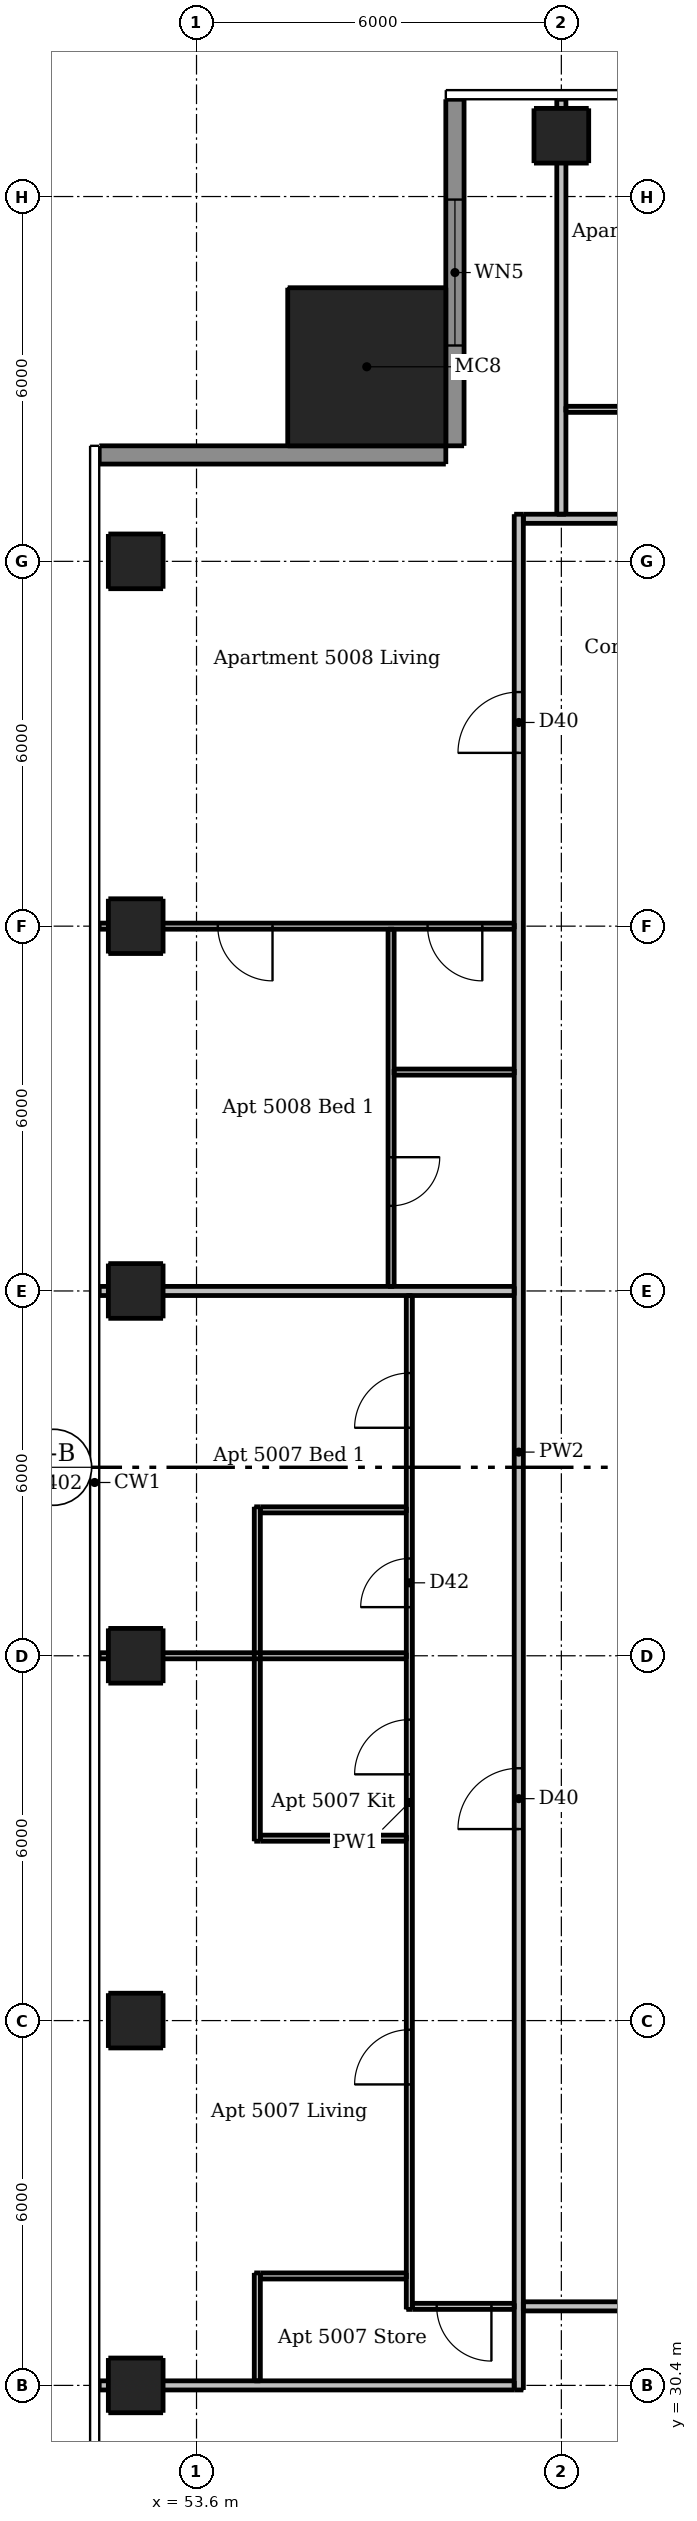
"""IFC4 building model, lengths in metres.
Left out: names, types, materials, properties, quantities, classifications, styles, units other than length and angle.
Written with IfcOpenShell. Run it as: python <this file> out.ifc"""

import sys

from ifc_helpers import new_model, si_unit, direction, frame, frame_2d, origin, origin_2d, place, context, subcontext, project, spatial, rectangle, extrude, element, fill, save


model = new_model("IFC4")
c1 = context("Model", 3, precision=1e-05, world=origin(), true_north=direction((0.0, 1.0)))
c2 = subcontext(c1, "Body", "Model", "MODEL_VIEW")
j1 = project(units=[si_unit("LENGTHUNIT", "METRE"), si_unit("PLANEANGLEUNIT", "RADIAN")], contexts=[c1])
p1 = place(None, origin())
s1 = spatial("IfcSite", under=j1, at=p1, CompositionType="ELEMENT")
p2 = place(p1, origin())
s2 = spatial("IfcBuilding", under=s1, at=p2, CompositionType="ELEMENT")
p3 = place(p2, frame((0.0, 0.0, 190.3)))
s3 = spatial("IfcBuildingStorey", under=s2, at=p3, CompositionType="ELEMENT", Elevation=190.3)
for number, where, z_axis, x_axis in (
    (1, (59.6, 67.4, 0.0), (0.0, 0.0, 1.0), (1.0, 0.0, 0.0)),
    (2, (52.6, 30.4, 0.0), (0.0, 0.0, 1.0), (1.0, 0.0, 0.0)),
    (3, (52.6, 36.4, 0.0), (0.0, 0.0, 1.0), (1.0, 0.0, 0.0)),
    (4, (52.6, 42.4, 0.0), (0.0, 0.0, 1.0), (1.0, 0.0, 0.0)),
    (5, (52.6, 48.4, 0.0), (0.0, 0.0, 1.0), (1.0, 0.0, 0.0)),
    (6, (52.6, 54.4, 0.0), (0.0, 0.0, 1.0), (1.0, 0.0, 0.0)),
    (7, (52.6, 60.4, 0.0), (0.0, 0.0, 1.0), (1.0, 0.0, 0.0)),
):
    element("IfcColumn", number, at=place(p3, frame(where, z_axis=z_axis, x_axis=x_axis)), inside=s3, PredefinedType="COLUMN", context=c2, shape_type="SweptSolid", body=[
        extrude(rectangle(XDim=0.9, YDim=0.9, at=origin_2d()), origin(), (0.0, 0.0, 1.0), 3.05),
    ])
p4 = place(p3, frame((56.4, 63.6, 0.0), z_axis=(0.0, 0.0, 1.0), x_axis=(1.0, 0.0, 0.0)))
e8 = element("IfcColumn", 8, at=p4, inside=s3, PredefinedType="COLUMN", context=c2, shape_type="SweptSolid", body=[
    extrude(rectangle(XDim=2.6, YDim=2.6, at=origin_2d()), origin(), (0.0, 0.0, 1.0), 3.3),
])
p5 = place(p3, frame((57.85, 68.0, 0.0), z_axis=(0.0, 0.0, 1.0), x_axis=(0.0, -1.0, 0.0)))
e9 = element("IfcWall", 9, at=p5, inside=s3, PredefinedType="SOLIDWALL", context=c2, shape_type="SweptSolid", body=[
    extrude(rectangle(XDim=5.7, YDim=0.3, at=frame_2d((2.85, 0.0))), origin(), (0.0, 0.0, 1.0), 3.05),
])
p6 = place(p5, frame((1.65, 0.0, 0.15)))
e10 = element("IfcOpeningElement", 10, at=p6, cuts=e9, PredefinedType="OPENING", context=c2, shape_type="SweptSolid", body=[
    extrude(rectangle(XDim=2.4, YDim=2.1, at=frame_2d((1.2, 1.05))), frame((0.0, 0.16, 0.0), z_axis=(0.0, -1.0, 0.0), x_axis=(1.0, 0.0, 0.0)), (0.0, 0.0, 1.0), 0.32),
])
p7 = place(p3, frame((57.7, 62.15, 0.0), z_axis=(0.0, 0.0, 1.0), x_axis=(-1.0, 0.0, 0.0)))
e11 = element("IfcWall", 11, at=p7, inside=s3, PredefinedType="SOLIDWALL", context=c2, shape_type="SweptSolid", body=[
    extrude(rectangle(XDim=5.7, YDim=0.3, at=frame_2d((2.85, 0.0))), origin(), (0.0, 0.0, 1.0), 3.05),
])
p8 = place(p3, frame((54.6, 30.475, 0.0), z_axis=(0.0, 0.0, 1.0), x_axis=(0.0, 1.0, 0.0)))
e12 = element("IfcWall", 12, at=p8, inside=s3, PredefinedType="PARTITIONING", context=c2, shape_type="SweptSolid", body=[
    extrude(rectangle(XDim=1.775, YDim=0.1, at=frame_2d((0.887, 0.0))), origin(), (0.0, 0.0, 1.0), 3.05),
])
p9 = place(p3, frame((54.6, 39.35, 0.0), z_axis=(0.0, 0.0, 1.0), x_axis=(0.0, 1.0, 0.0)))
e13 = element("IfcWall", 13, at=p9, inside=s3, PredefinedType="PARTITIONING", context=c2, shape_type="SweptSolid", body=[
    extrude(rectangle(XDim=5.5, YDim=0.1, at=frame_2d((2.75, 0.0))), origin(), (0.0, 0.0, 1.0), 3.05),
])
p10 = place(p3, frame((56.8, 54.35, 0.0), z_axis=(0.0, 0.0, 1.0), x_axis=(0.0, -1.0, 0.0)))
e14 = element("IfcWall", 14, at=p10, inside=s3, PredefinedType="PARTITIONING", context=c2, shape_type="SweptSolid", body=[
    extrude(rectangle(XDim=5.875, YDim=0.1, at=frame_2d((2.938, 0.0))), origin(), (0.0, 0.0, 1.0), 3.05),
])
p11 = place(p10, frame((3.75, 0.0, 0.0)))
e15 = element("IfcOpeningElement", 15, at=p11, cuts=e14, PredefinedType="OPENING", context=c2, shape_type="SweptSolid", body=[
    extrude(rectangle(XDim=0.8, YDim=2.1, at=frame_2d((0.4, 1.05))), frame((0.0, 0.06, 0.0), z_axis=(0.0, -1.0, 0.0), x_axis=(1.0, 0.0, 0.0)), (0.0, 0.0, 1.0), 0.12),
])
p12 = place(p3, frame((57.1, 31.65, 0.0), z_axis=(0.0, 0.0, 1.0), x_axis=(0.0, 1.0, 0.0)))
e16 = element("IfcWall", 16, at=p12, inside=s3, PredefinedType="PARTITIONING", context=c2, shape_type="SweptSolid", body=[
    extrude(rectangle(XDim=16.675, YDim=0.1, at=frame_2d((8.337, 0.0))), origin(), (0.0, 0.0, 1.0), 3.05),
])
p13 = place(p12, frame((3.7, 0.0, 0.0)))
e17 = element("IfcOpeningElement", 17, at=p13, cuts=e16, PredefinedType="OPENING", context=c2, shape_type="SweptSolid", body=[
    extrude(rectangle(XDim=0.9, YDim=2.1, at=frame_2d((0.45, 1.05))), frame((0.0, 0.06, 0.0), z_axis=(0.0, -1.0, 0.0), x_axis=(1.0, 0.0, 0.0)), (0.0, 0.0, 1.0), 0.12),
])
p14 = place(p12, frame((8.8, 0.0, 0.0)))
e18 = element("IfcOpeningElement", 18, at=p14, cuts=e16, PredefinedType="OPENING", context=c2, shape_type="SweptSolid", body=[
    extrude(rectangle(XDim=0.9, YDim=2.1, at=frame_2d((0.45, 1.05))), frame((0.0, 0.06, 0.0), z_axis=(0.0, -1.0, 0.0), x_axis=(1.0, 0.0, 0.0)), (0.0, 0.0, 1.0), 0.12),
])
p15 = place(p12, frame((14.5, 0.0, 0.0)))
e19 = element("IfcOpeningElement", 19, at=p15, cuts=e16, PredefinedType="OPENING", context=c2, shape_type="SweptSolid", body=[
    extrude(rectangle(XDim=0.9, YDim=2.1, at=frame_2d((0.45, 1.05))), frame((0.0, 0.06, 0.0), z_axis=(0.0, -1.0, 0.0), x_axis=(1.0, 0.0, 0.0)), (0.0, 0.0, 1.0), 0.12),
])
p16 = place(p12, frame((11.55, 0.0, 0.0)))
e20 = element("IfcOpeningElement", 20, at=p16, cuts=e16, PredefinedType="OPENING", context=c2, shape_type="SweptSolid", body=[
    extrude(rectangle(XDim=0.8, YDim=2.1, at=frame_2d((0.4, 1.05))), frame((0.0, 0.06, 0.0), z_axis=(0.0, -1.0, 0.0), x_axis=(1.0, 0.0, 0.0)), (0.0, 0.0, 1.0), 0.12),
])
p17 = place(p3, frame((59.675, 62.9, 0.0), z_axis=(0.0, 0.0, 1.0), x_axis=(1.0, 0.0, 0.0)))
e21 = element("IfcWall", 21, at=p17, inside=s3, PredefinedType="PARTITIONING", context=c2, shape_type="SweptSolid", body=[
    extrude(rectangle(XDim=17.85, YDim=0.1, at=frame_2d((8.925, 0.0))), origin(), (0.0, 0.0, 1.0), 3.05),
])
p18 = place(p17, frame((10.875, 0.0, 0.0)))
e22 = element("IfcOpeningElement", 22, at=p18, cuts=e21, PredefinedType="OPENING", context=c2, shape_type="SweptSolid", body=[
    extrude(rectangle(XDim=0.9, YDim=2.1, at=frame_2d((0.45, 1.05))), frame((0.0, 0.06, 0.0), z_axis=(0.0, -1.0, 0.0), x_axis=(1.0, 0.0, 0.0)), (0.0, 0.0, 1.0), 0.12),
])
p19 = place(p17, frame((15.975, 0.0, 0.0)))
e23 = element("IfcOpeningElement", 23, at=p19, cuts=e21, PredefinedType="OPENING", context=c2, shape_type="SweptSolid", body=[
    extrude(rectangle(XDim=0.9, YDim=2.1, at=frame_2d((0.45, 1.05))), frame((0.0, 0.06, 0.0), z_axis=(0.0, -1.0, 0.0), x_axis=(1.0, 0.0, 0.0)), (0.0, 0.0, 1.0), 0.12),
])
p20 = place(p17, frame((6.375, 0.0, 0.0)))
e24 = element("IfcOpeningElement", 24, at=p20, cuts=e21, PredefinedType="OPENING", context=c2, shape_type="SweptSolid", body=[
    extrude(rectangle(XDim=0.9, YDim=2.1, at=frame_2d((0.45, 1.05))), frame((0.0, 0.06, 0.0), z_axis=(0.0, -1.0, 0.0), x_axis=(1.0, 0.0, 0.0)), (0.0, 0.0, 1.0), 0.12),
])
p21 = place(p17, frame((1.275, 0.0, 0.0)))
e25 = element("IfcOpeningElement", 25, at=p21, cuts=e21, PredefinedType="OPENING", context=c2, shape_type="SweptSolid", body=[
    extrude(rectangle(XDim=0.9, YDim=2.1, at=frame_2d((0.45, 1.05))), frame((0.0, 0.06, 0.0), z_axis=(0.0, -1.0, 0.0), x_axis=(1.0, 0.0, 0.0)), (0.0, 0.0, 1.0), 0.12),
])
p22 = place(p17, frame((4.325, 0.0, 0.0)))
e26 = element("IfcOpeningElement", 26, at=p22, cuts=e21, PredefinedType="OPENING", context=c2, shape_type="SweptSolid", body=[
    extrude(rectangle(XDim=0.8, YDim=2.1, at=frame_2d((0.4, 1.05))), frame((0.0, 0.06, 0.0), z_axis=(0.0, -1.0, 0.0), x_axis=(1.0, 0.0, 0.0)), (0.0, 0.0, 1.0), 0.12),
])
p23 = place(p3, frame((58.825, 54.4, 0.0), z_axis=(0.0, 0.0, 1.0), x_axis=(-1.0, 0.0, 0.0)))
e27 = element("IfcWall", 27, at=p23, inside=s3, PredefinedType="PARTITIONING", context=c2, shape_type="SweptSolid", body=[
    extrude(rectangle(XDim=6.825, YDim=0.1, at=frame_2d((3.413, 0.0))), origin(), (0.0, 0.0, 1.0), 2.516),
])
p24 = place(p23, frame((0.525, 0.0, 0.0)))
e28 = element("IfcOpeningElement", 28, at=p24, cuts=e27, PredefinedType="OPENING", context=c2, shape_type="SweptSolid", body=[
    extrude(rectangle(XDim=0.9, YDim=2.1, at=frame_2d((0.45, 1.05))), frame((0.0, 0.06, 0.0), z_axis=(0.0, -1.0, 0.0), x_axis=(1.0, 0.0, 0.0)), (0.0, 0.0, 1.0), 0.12),
])
p25 = place(p23, frame((3.975, 0.0, 0.0)))
e29 = element("IfcOpeningElement", 29, at=p25, cuts=e27, PredefinedType="OPENING", context=c2, shape_type="SweptSolid", body=[
    extrude(rectangle(XDim=0.9, YDim=2.1, at=frame_2d((0.45, 1.05))), frame((0.0, 0.06, 0.0), z_axis=(0.0, -1.0, 0.0), x_axis=(1.0, 0.0, 0.0)), (0.0, 0.0, 1.0), 0.12),
])
p26 = place(p3, frame((56.85, 52.0, 0.0), z_axis=(0.0, 0.0, 1.0), x_axis=(1.0, 0.0, 0.0)))
e30 = element("IfcWall", 30, at=p26, inside=s3, PredefinedType="PARTITIONING", context=c2, shape_type="SweptSolid", body=[
    extrude(rectangle(XDim=1.975, YDim=0.1, at=frame_2d((0.987, 0.0))), origin(), (0.0, 0.0, 1.0), 3.05),
])
p27 = place(p3, frame((54.65, 44.8, 0.0), z_axis=(0.0, 0.0, 1.0), x_axis=(1.0, 0.0, 0.0)))
e31 = element("IfcWall", 31, at=p27, inside=s3, PredefinedType="PARTITIONING", context=c2, shape_type="SweptSolid", body=[
    extrude(rectangle(XDim=2.4, YDim=0.1, at=frame_2d((1.2, 0.0))), origin(), (0.0, 0.0, 1.0), 3.05),
])
p28 = place(p3, frame((52.0, 42.4, 0.0), z_axis=(0.0, 0.0, 1.0), x_axis=(1.0, 0.0, 0.0)))
e32 = element("IfcWall", 32, at=p28, inside=s3, PredefinedType="PARTITIONING", context=c2, shape_type="SweptSolid", body=[
    extrude(rectangle(XDim=5.05, YDim=0.1, at=frame_2d((2.525, 0.0))), origin(), (0.0, 0.0, 1.0), 2.516),
])
for number, where, z_axis, x_axis in (
    (33, (54.65, 39.4, 0.0), (0.0, 0.0, 1.0), (1.0, 0.0, 0.0)),
    (34, (54.65, 32.2, 0.0), (0.0, 0.0, 1.0), (1.0, 0.0, 0.0)),
):
    element("IfcWall", number, at=place(p3, frame(where, z_axis=z_axis, x_axis=x_axis)), inside=s3, PredefinedType="PARTITIONING", context=c2, shape_type="SweptSolid", body=[
        extrude(rectangle(XDim=2.4, YDim=0.1, at=frame_2d((1.2, 0.0))), origin(), (0.0, 0.0, 1.0), 3.05),
    ])
p29 = place(p3, frame((58.825, 31.7, 0.0), z_axis=(0.0, 0.0, 1.0), x_axis=(-1.0, 0.0, 0.0)))
e35 = element("IfcWall", 35, at=p29, inside=s3, PredefinedType="PARTITIONING", context=c2, shape_type="SweptSolid", body=[
    extrude(rectangle(XDim=1.675, YDim=0.1, at=frame_2d((0.837, 0.0))), origin(), (0.0, 0.0, 1.0), 3.05),
])
p30 = place(p29, frame((0.375, 0.0, 0.0)))
e36 = element("IfcOpeningElement", 36, at=p30, cuts=e35, PredefinedType="OPENING", context=c2, shape_type="SweptSolid", body=[
    extrude(rectangle(XDim=0.9, YDim=2.1, at=frame_2d((0.45, 1.05))), frame((0.0, 0.06, 0.0), z_axis=(0.0, -1.0, 0.0), x_axis=(1.0, 0.0, 0.0)), (0.0, 0.0, 1.0), 0.12),
])
p31 = place(p3, frame((58.9, 30.325, 0.0), z_axis=(0.0, 0.0, 1.0), x_axis=(0.0, 1.0, 0.0)))
e37 = element("IfcWall", 37, at=p31, inside=s3, PredefinedType="PARTITIONING", context=c2, shape_type="SweptSolid", body=[
    extrude(rectangle(XDim=30.85, YDim=0.15, at=frame_2d((15.425, 0.0))), origin(), (0.0, 0.0, 1.0), 3.05),
])
p32 = place(p31, frame((9.225, 0.0, 0.0)))
e38 = element("IfcOpeningElement", 38, at=p32, cuts=e37, PredefinedType="OPENING", context=c2, shape_type="SweptSolid", body=[
    extrude(rectangle(XDim=1.0, YDim=2.1, at=frame_2d((0.5, 1.05))), frame((0.0, 0.085, 0.0), z_axis=(0.0, -1.0, 0.0), x_axis=(1.0, 0.0, 0.0)), (0.0, 0.0, 1.0), 0.17),
])
p33 = place(p31, frame((26.925, 0.0, 0.0)))
e39 = element("IfcOpeningElement", 39, at=p33, cuts=e37, PredefinedType="OPENING", context=c2, shape_type="SweptSolid", body=[
    extrude(rectangle(XDim=1.0, YDim=2.1, at=frame_2d((0.5, 1.05))), frame((0.0, 0.085, 0.0), z_axis=(0.0, -1.0, 0.0), x_axis=(1.0, 0.0, 0.0)), (0.0, 0.0, 1.0), 0.17),
])
p34 = place(p3, frame((59.6, 61.175, 0.0), z_axis=(0.0, 0.0, 1.0), x_axis=(0.0, 1.0, 0.0)))
e40 = element("IfcWall", 40, at=p34, inside=s3, PredefinedType="PARTITIONING", context=c2, shape_type="SweptSolid", body=[
    extrude(rectangle(XDim=6.825, YDim=0.15, at=frame_2d((3.413, 0.0))), origin(), (0.0, 0.0, 1.0), 2.51),
])
p35 = place(p3, frame((58.975, 61.1, 0.0), z_axis=(0.0, 0.0, 1.0), x_axis=(1.0, 0.0, 0.0)))
e41 = element("IfcWall", 41, at=p35, inside=s3, PredefinedType="PARTITIONING", context=c2, shape_type="SweptSolid", body=[
    extrude(rectangle(XDim=29.25, YDim=0.15, at=frame_2d((14.625, 0.0))), origin(), (0.0, 0.0, 1.0), 3.05),
])
p36 = place(p35, frame((9.125, 0.0, 0.0)))
e42 = element("IfcOpeningElement", 42, at=p36, cuts=e41, PredefinedType="OPENING", context=c2, shape_type="SweptSolid", body=[
    extrude(rectangle(XDim=1.0, YDim=2.1, at=frame_2d((0.5, 1.05))), frame((0.0, 0.085, 0.0), z_axis=(0.0, -1.0, 0.0), x_axis=(1.0, 0.0, 0.0)), (0.0, 0.0, 1.0), 0.17),
])
p37 = place(p35, frame((26.475, 0.0, 0.0)))
e43 = element("IfcOpeningElement", 43, at=p37, cuts=e41, PredefinedType="OPENING", context=c2, shape_type="SweptSolid", body=[
    extrude(rectangle(XDim=1.0, YDim=2.1, at=frame_2d((0.5, 1.05))), frame((0.0, 0.085, 0.0), z_axis=(0.0, -1.0, 0.0), x_axis=(1.0, 0.0, 0.0)), (0.0, 0.0, 1.0), 0.17),
])
p38 = place(p3, frame((52.0, 48.4, 0.0), z_axis=(0.0, 0.0, 1.0), x_axis=(1.0, 0.0, 0.0)))
e44 = element("IfcWall", 44, at=p38, inside=s3, PredefinedType="PARTITIONING", context=c2, shape_type="SweptSolid", body=[
    extrude(rectangle(XDim=6.825, YDim=0.15, at=frame_2d((3.413, 0.0))), origin(), (0.0, 0.0, 1.0), 2.516),
])
p39 = place(p3, frame((89.525, 31.7, 0.0), z_axis=(0.0, 0.0, 1.0), x_axis=(-1.0, 0.0, 0.0)))
e45 = element("IfcWall", 45, at=p39, inside=s3, PredefinedType="PARTITIONING", context=c2, shape_type="SweptSolid", body=[
    extrude(rectangle(XDim=30.55, YDim=0.15, at=frame_2d((15.275, 0.0))), origin(), (0.0, 0.0, 1.0), 3.05),
])
p40 = place(p39, frame((26.775, 0.0, 0.0)))
e46 = element("IfcOpeningElement", 46, at=p40, cuts=e45, PredefinedType="OPENING", context=c2, shape_type="SweptSolid", body=[
    extrude(rectangle(XDim=1.0, YDim=2.1, at=frame_2d((0.5, 1.05))), frame((0.0, 0.085, 0.0), z_axis=(0.0, -1.0, 0.0), x_axis=(1.0, 0.0, 0.0)), (0.0, 0.0, 1.0), 0.17),
])
p41 = place(p39, frame((9.075, 0.0, 0.0)))
e47 = element("IfcOpeningElement", 47, at=p41, cuts=e45, PredefinedType="OPENING", context=c2, shape_type="SweptSolid", body=[
    extrude(rectangle(XDim=1.0, YDim=2.1, at=frame_2d((0.5, 1.05))), frame((0.0, 0.085, 0.0), z_axis=(0.0, -1.0, 0.0), x_axis=(1.0, 0.0, 0.0)), (0.0, 0.0, 1.0), 0.17),
])
p42 = place(p3, frame((52.0, 30.4, 0.0), z_axis=(0.0, 0.0, 1.0), x_axis=(1.0, 0.0, 0.0)))
e48 = element("IfcWall", 48, at=p42, inside=s3, PredefinedType="PARTITIONING", context=c2, shape_type="SweptSolid", body=[
    extrude(rectangle(XDim=6.825, YDim=0.15, at=frame_2d((3.413, 0.0))), origin(), (0.0, 0.0, 1.0), 2.647),
])
p43 = place(p6, origin())
e49 = element("IfcWindow", 49, at=p43, inside=s3, PartitioningType="DOUBLE_PANEL_VERTICAL", PredefinedType="WINDOW", context=c2, shape_type="SweptSolid", body=[
    extrude(rectangle(XDim=2.4, YDim=2.1, at=frame_2d((1.2, 1.05))), frame((0.0, 0.03, 0.0), z_axis=(0.0, -1.0, 0.0), x_axis=(1.0, 0.0, 0.0)), (0.0, 0.0, 1.0), 0.06),
])
fill(e10, e49)
p44 = place(p32, origin())
e50 = element("IfcDoor", 50, at=p44, inside=s3, OperationType="SINGLE_SWING_LEFT", PredefinedType="DOOR", context=c2, shape_type="SweptSolid", body=[
    extrude(rectangle(XDim=1.0, YDim=2.1, at=frame_2d((0.5, 1.05))), frame((0.0, 0.025, 0.0), z_axis=(0.0, -1.0, 0.0), x_axis=(1.0, 0.0, 0.0)), (0.0, 0.0, 1.0), 0.05),
])
fill(e38, e50)
p45 = place(p13, origin())
e51 = element("IfcDoor", 51, at=p45, inside=s3, OperationType="SINGLE_SWING_LEFT", PredefinedType="DOOR", context=c2, shape_type="SweptSolid", body=[
    extrude(rectangle(XDim=0.9, YDim=2.1, at=frame_2d((0.45, 1.05))), frame((0.0, 0.025, 0.0), z_axis=(0.0, -1.0, 0.0), x_axis=(1.0, 0.0, 0.0)), (0.0, 0.0, 1.0), 0.05),
])
fill(e17, e51)
p46 = place(p14, origin())
e52 = element("IfcDoor", 52, at=p46, inside=s3, OperationType="SINGLE_SWING_LEFT", PredefinedType="DOOR", context=c2, shape_type="SweptSolid", body=[
    extrude(rectangle(XDim=0.9, YDim=2.1, at=frame_2d((0.45, 1.05))), frame((0.0, 0.025, 0.0), z_axis=(0.0, -1.0, 0.0), x_axis=(1.0, 0.0, 0.0)), (0.0, 0.0, 1.0), 0.05),
])
fill(e18, e52)
p47 = place(p30, origin())
e53 = element("IfcDoor", 53, at=p47, inside=s3, OperationType="SINGLE_SWING_LEFT", PredefinedType="DOOR", context=c2, shape_type="SweptSolid", body=[
    extrude(rectangle(XDim=0.9, YDim=2.1, at=frame_2d((0.45, 1.05))), frame((0.0, 0.025, 0.0), z_axis=(0.0, -1.0, 0.0), x_axis=(1.0, 0.0, 0.0)), (0.0, 0.0, 1.0), 0.05),
])
fill(e36, e53)
p48 = place(p15, origin())
e54 = element("IfcDoor", 54, at=p48, inside=s3, OperationType="SINGLE_SWING_LEFT", PredefinedType="DOOR", context=c2, shape_type="SweptSolid", body=[
    extrude(rectangle(XDim=0.9, YDim=2.1, at=frame_2d((0.45, 1.05))), frame((0.0, 0.025, 0.0), z_axis=(0.0, -1.0, 0.0), x_axis=(1.0, 0.0, 0.0)), (0.0, 0.0, 1.0), 0.05),
])
fill(e19, e54)
p49 = place(p16, origin())
e55 = element("IfcDoor", 55, at=p49, inside=s3, OperationType="SINGLE_SWING_LEFT", PredefinedType="DOOR", context=c2, shape_type="SweptSolid", body=[
    extrude(rectangle(XDim=0.8, YDim=2.1, at=frame_2d((0.4, 1.05))), frame((0.0, 0.025, 0.0), z_axis=(0.0, -1.0, 0.0), x_axis=(1.0, 0.0, 0.0)), (0.0, 0.0, 1.0), 0.05),
])
fill(e20, e55)
p50 = place(p33, origin())
e56 = element("IfcDoor", 56, at=p50, inside=s3, OperationType="SINGLE_SWING_LEFT", PredefinedType="DOOR", context=c2, shape_type="SweptSolid", body=[
    extrude(rectangle(XDim=1.0, YDim=2.1, at=frame_2d((0.5, 1.05))), frame((0.0, 0.025, 0.0), z_axis=(0.0, -1.0, 0.0), x_axis=(1.0, 0.0, 0.0)), (0.0, 0.0, 1.0), 0.05),
])
fill(e39, e56)
p51 = place(p24, origin())
e57 = element("IfcDoor", 57, at=p51, inside=s3, OperationType="SINGLE_SWING_LEFT", PredefinedType="DOOR", context=c2, shape_type="SweptSolid", body=[
    extrude(rectangle(XDim=0.9, YDim=2.1, at=frame_2d((0.45, 1.05))), frame((0.0, 0.025, 0.0), z_axis=(0.0, -1.0, 0.0), x_axis=(1.0, 0.0, 0.0)), (0.0, 0.0, 1.0), 0.05),
])
fill(e28, e57)
p52 = place(p25, origin())
e58 = element("IfcDoor", 58, at=p52, inside=s3, OperationType="SINGLE_SWING_LEFT", PredefinedType="DOOR", context=c2, shape_type="SweptSolid", body=[
    extrude(rectangle(XDim=0.9, YDim=2.1, at=frame_2d((0.45, 1.05))), frame((0.0, 0.025, 0.0), z_axis=(0.0, -1.0, 0.0), x_axis=(1.0, 0.0, 0.0)), (0.0, 0.0, 1.0), 0.05),
])
fill(e29, e58)
p53 = place(p11, origin())
e59 = element("IfcDoor", 59, at=p53, inside=s3, OperationType="SINGLE_SWING_LEFT", PredefinedType="DOOR", context=c2, shape_type="SweptSolid", body=[
    extrude(rectangle(XDim=0.8, YDim=2.1, at=frame_2d((0.4, 1.05))), frame((0.0, 0.025, 0.0), z_axis=(0.0, -1.0, 0.0), x_axis=(1.0, 0.0, 0.0)), (0.0, 0.0, 1.0), 0.05),
])
fill(e15, e59)
save(model, sys.argv[1])
